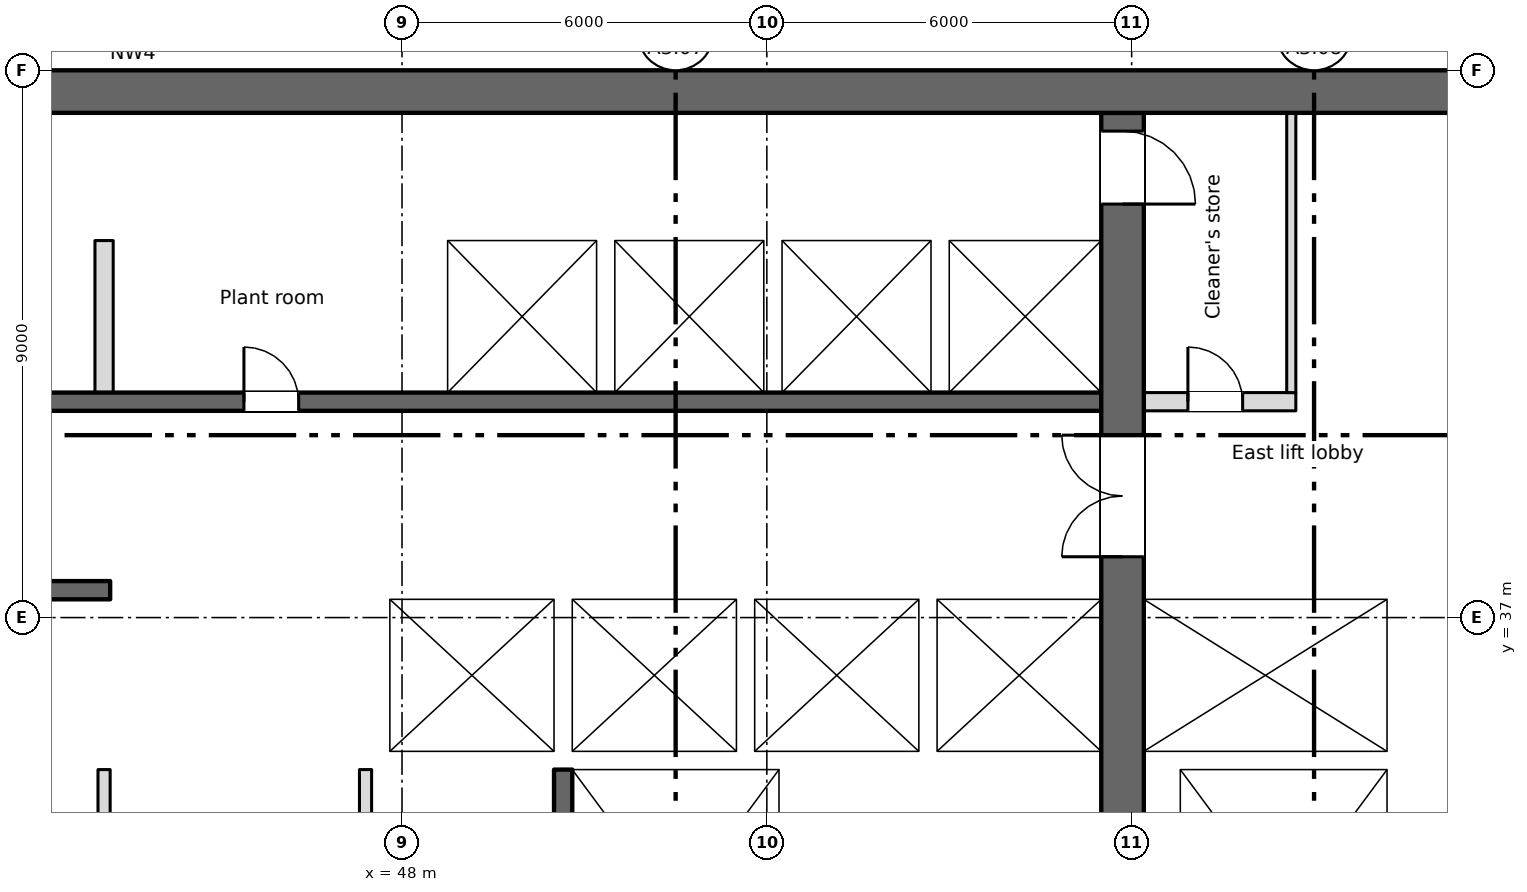
"""IFC4 building model, lengths in metres.
Left out: names, types, materials, properties, quantities, classifications, styles, units other than length and angle.
Written with IfcOpenShell. Run it as: python <this file> out.ifc"""

import sys

from ifc_helpers import new_model, si_unit, direction, frame, frame_2d, origin, place, context, subcontext, project, spatial, rectangle, extrude, element, fill, save


model = new_model("IFC4")
c1 = context("Model", 3, precision=1e-05, world=origin(), true_north=direction((0.0, 1.0)))
c2 = subcontext(c1, "Body", "Model", "MODEL_VIEW")
j1 = project(units=[si_unit("LENGTHUNIT", "METRE"), si_unit("PLANEANGLEUNIT", "RADIAN")], contexts=[c1])
p1 = place(None, origin())
s1 = spatial("IfcSite", under=j1, at=p1, CompositionType="ELEMENT")
p2 = place(p1, origin())
s2 = spatial("IfcBuilding", under=s1, at=p2, CompositionType="ELEMENT")
p3 = place(p2, frame((0.0, 0.0, 208.0)))
s3 = spatial("IfcBuildingStorey", under=s2, at=p3, CompositionType="ELEMENT", Elevation=208.0)
p4 = place(p3, frame((11.55, 45.65, 0.0), z_axis=(0.0, 0.0, 1.0), x_axis=(1.0, 0.0, 0.0)))
e1 = element("IfcWall", 1, at=p4, inside=s3, PredefinedType="SHEAR", context=c2, shape_type="SweptSolid", body=[
    extrude(rectangle(XDim=54.9, YDim=0.7, at=frame_2d((27.45, 0.0))), origin(), (0.0, 0.0, 1.0), 3.35),
])
p5 = place(p3, frame((64.35, 34.8, 0.0), z_axis=(0.0, 0.0, 1.0), x_axis=(0.0, 1.0, 0.0)))
e2 = element("IfcWall", 2, at=p5, inside=s3, PredefinedType="SHEAR", context=c2, shape_type="SweptSolid", body=[
    extrude(rectangle(XDim=10.5, YDim=0.3, at=frame_2d((5.25, 0.0))), origin(), (0.0, 0.0, 1.0), 3.35),
])
p6 = place(p3, frame((59.85, 28.4, 0.0), z_axis=(0.0, 0.0, 1.0), x_axis=(0.0, 1.0, 0.0)))
e3 = element("IfcWall", 3, at=p6, inside=s3, PredefinedType="SHEAR", context=c2, shape_type="SweptSolid", body=[
    extrude(rectangle(XDim=16.9, YDim=0.7, at=frame_2d((8.45, 0.0))), origin(), (0.0, 0.0, 1.0), 3.35),
])
p7 = place(p6, frame((9.6, 0.0, 0.0)))
e4 = element("IfcOpeningElement", 4, at=p7, cuts=e3, PredefinedType="OPENING", context=c2, shape_type="SweptSolid", body=[
    extrude(rectangle(XDim=2.0, YDim=2.1, at=frame_2d((1.0, 1.05))), frame((0.0, 0.36, 0.0), z_axis=(0.0, -1.0, 0.0), x_axis=(1.0, 0.0, 0.0)), (0.0, 0.0, 1.0), 0.72),
])
p8 = place(p6, frame((15.4, 0.0, 0.0)))
e5 = element("IfcOpeningElement", 5, at=p8, cuts=e3, PredefinedType="OPENING", context=c2, shape_type="SweptSolid", body=[
    extrude(rectangle(XDim=1.2, YDim=2.1, at=frame_2d((0.6, 1.05))), frame((0.0, 0.36, 0.0), z_axis=(0.0, -1.0, 0.0), x_axis=(1.0, 0.0, 0.0)), (0.0, 0.0, 1.0), 0.72),
])
p9 = place(p3, frame((50.65, 34.5, 0.0), z_axis=(0.0, 0.0, 1.0), x_axis=(0.0, -1.0, 0.0)))
e6 = element("IfcWall", 6, at=p9, inside=s3, PredefinedType="SHEAR", context=c2, shape_type="SweptSolid", body=[
    extrude(rectangle(XDim=6.1, YDim=0.3, at=frame_2d((3.05, 0.0))), origin(), (0.0, 0.0, 1.0), 3.35),
])
p10 = place(p9, frame((4.95, 0.0, 0.0)))
e7 = element("IfcOpeningElement", 7, at=p10, cuts=e6, PredefinedType="OPENING", context=c2, shape_type="SweptSolid", body=[
    extrude(rectangle(XDim=1.1, YDim=2.1, at=frame_2d((0.55, 1.05))), frame((0.0, 0.16, 0.0), z_axis=(0.0, -1.0, 0.0), x_axis=(1.0, 0.0, 0.0)), (0.0, 0.0, 1.0), 0.32),
])
p11 = place(p3, frame((54.35, 28.4, 0.0), z_axis=(0.0, 0.0, 1.0), x_axis=(0.0, 1.0, 0.0)))
e8 = element("IfcWall", 8, at=p11, inside=s3, PredefinedType="SHEAR", context=c2, shape_type="SweptSolid", body=[
    extrude(rectangle(XDim=6.1, YDim=0.3, at=frame_2d((3.05, 0.0))), origin(), (0.0, 0.0, 1.0), 3.35),
])
p12 = place(p3, frame((60.5, 28.4, 0.0), z_axis=(0.0, 0.0, 1.0), x_axis=(0.0, 1.0, 0.0)))
e9 = element("IfcWall", 9, at=p12, inside=s3, PredefinedType="SHEAR", context=c2, shape_type="SweptSolid", body=[
    extrude(rectangle(XDim=6.1, YDim=0.6, at=frame_2d((3.05, 0.0))), origin(), (0.0, 0.0, 1.0), 3.35),
])
p13 = place(p3, frame((64.35, 28.4, 0.0), z_axis=(0.0, 0.0, 1.0), x_axis=(0.0, 1.0, 0.0)))
e10 = element("IfcWall", 10, at=p13, inside=s3, PredefinedType="SHEAR", context=c2, shape_type="SweptSolid", body=[
    extrude(rectangle(XDim=6.1, YDim=0.3, at=frame_2d((3.05, 0.0))), origin(), (0.0, 0.0, 1.0), 3.35),
])
p14 = place(p3, frame((34.8, 34.65, 0.0), z_axis=(0.0, 0.0, 1.0), x_axis=(1.0, 0.0, 0.0)))
e11 = element("IfcWall", 11, at=p14, inside=s3, PredefinedType="SHEAR", context=c2, shape_type="SweptSolid", body=[
    extrude(rectangle(XDim=8.4, YDim=0.3, at=frame_2d((4.2, 0.0))), origin(), (0.0, 0.0, 1.0), 3.35),
])
p15 = place(p3, frame((47.3, 34.65, 0.0), z_axis=(0.0, 0.0, 1.0), x_axis=(1.0, 0.0, 0.0)))
e12 = element("IfcWall", 12, at=p15, inside=s3, PredefinedType="SHEAR", context=c2, shape_type="SweptSolid", body=[
    extrude(rectangle(XDim=12.2, YDim=0.3, at=frame_2d((6.1, 0.0))), origin(), (0.0, 0.0, 1.0), 3.35),
])
p16 = place(p15, frame((1.3, 0.0, 0.0)))
e13 = element("IfcOpeningElement", 13, at=p16, cuts=e12, PredefinedType="OPENING", context=c2, shape_type="SweptSolid", body=[
    extrude(rectangle(XDim=1.1, YDim=2.1, at=frame_2d((0.55, 1.05))), frame((0.0, 0.16, 0.0), z_axis=(0.0, -1.0, 0.0), x_axis=(1.0, 0.0, 0.0)), (0.0, 0.0, 1.0), 0.32),
])
p17 = place(p3, frame((60.2, 34.65, 0.0), z_axis=(0.0, 0.0, 1.0), x_axis=(1.0, 0.0, 0.0)))
e14 = element("IfcWall", 14, at=p17, inside=s3, PredefinedType="SHEAR", context=c2, shape_type="SweptSolid", body=[
    extrude(rectangle(XDim=4.3, YDim=0.3, at=frame_2d((2.15, 0.0))), origin(), (0.0, 0.0, 1.0), 3.35),
])
p18 = place(p3, frame((43.2, 37.45, 0.0), z_axis=(0.0, 0.0, 1.0), x_axis=(-1.0, 0.0, 0.0)))
e15 = element("IfcWall", 15, at=p18, inside=s3, PredefinedType="SHEAR", context=c2, shape_type="SweptSolid", body=[
    extrude(rectangle(XDim=8.4, YDim=0.3, at=frame_2d((4.2, 0.0))), origin(), (0.0, 0.0, 1.0), 3.35),
])
p19 = place(p18, frame((3.75, 0.0, 0.0)))
e16 = element("IfcOpeningElement", 16, at=p19, cuts=e15, PredefinedType="OPENING", context=c2, shape_type="SweptSolid", body=[
    extrude(rectangle(XDim=0.9, YDim=2.1, at=frame_2d((0.45, 1.05))), frame((0.0, 0.16, 0.0), z_axis=(0.0, -1.0, 0.0), x_axis=(1.0, 0.0, 0.0)), (0.0, 0.0, 1.0), 0.32),
])
p20 = place(p3, frame((47.3, 37.45, 0.0), z_axis=(0.0, 0.0, 1.0), x_axis=(1.0, 0.0, 0.0)))
e17 = element("IfcWall", 17, at=p20, inside=s3, PredefinedType="SHEAR", context=c2, shape_type="SweptSolid", body=[
    extrude(rectangle(XDim=12.2, YDim=0.3, at=frame_2d((6.1, 0.0))), origin(), (0.0, 0.0, 1.0), 3.35),
])
p21 = place(p20, frame((4.3, 0.0, 0.0)))
e18 = element("IfcOpeningElement", 18, at=p21, cuts=e17, PredefinedType="OPENING", context=c2, shape_type="SweptSolid", body=[
    extrude(rectangle(XDim=1.1, YDim=2.1, at=frame_2d((0.55, 1.05))), frame((0.0, 0.16, 0.0), z_axis=(0.0, -1.0, 0.0), x_axis=(1.0, 0.0, 0.0)), (0.0, 0.0, 1.0), 0.32),
])
p22 = place(p20, frame((7.3, 0.0, 0.0)))
e19 = element("IfcOpeningElement", 19, at=p22, cuts=e17, PredefinedType="OPENING", context=c2, shape_type="SweptSolid", body=[
    extrude(rectangle(XDim=1.1, YDim=2.1, at=frame_2d((0.55, 1.05))), frame((0.0, 0.16, 0.0), z_axis=(0.0, -1.0, 0.0), x_axis=(1.0, 0.0, 0.0)), (0.0, 0.0, 1.0), 0.32),
])
p23 = place(p20, frame((10.3, 0.0, 0.0)))
e20 = element("IfcOpeningElement", 20, at=p23, cuts=e17, PredefinedType="OPENING", context=c2, shape_type="SweptSolid", body=[
    extrude(rectangle(XDim=1.1, YDim=2.1, at=frame_2d((0.55, 1.05))), frame((0.0, 0.16, 0.0), z_axis=(0.0, -1.0, 0.0), x_axis=(1.0, 0.0, 0.0)), (0.0, 0.0, 1.0), 0.32),
])
p24 = place(p3, frame((60.2, 37.45, 0.0), z_axis=(0.0, 0.0, 1.0), x_axis=(1.0, 0.0, 0.0)))
e21 = element("IfcWall", 21, at=p24, inside=s3, PredefinedType="SHEAR", context=c2, shape_type="SweptSolid", body=[
    extrude(rectangle(XDim=4.0, YDim=0.3, at=frame_2d((2.0, 0.0))), origin(), (0.0, 0.0, 1.0), 3.35),
])
p25 = place(p24, frame((1.45, 0.0, 0.0)))
e22 = element("IfcOpeningElement", 22, at=p25, cuts=e21, PredefinedType="OPENING", context=c2, shape_type="SweptSolid", body=[
    extrude(rectangle(XDim=1.1, YDim=2.1, at=frame_2d((0.55, 1.05))), frame((0.0, 0.16, 0.0), z_axis=(0.0, -1.0, 0.0), x_axis=(1.0, 0.0, 0.0)), (0.0, 0.0, 1.0), 0.32),
])
p26 = place(p3, frame((43.05, 34.8, 0.0), z_axis=(0.0, 0.0, 1.0), x_axis=(0.0, 1.0, 0.0)))
e23 = element("IfcWall", 23, at=p26, inside=s3, PredefinedType="SHEAR", context=c2, shape_type="SweptSolid", body=[
    extrude(rectangle(XDim=2.5, YDim=0.3, at=frame_2d((1.25, 0.0))), origin(), (0.0, 0.0, 1.0), 3.35),
])
p27 = place(p3, frame((47.55, 34.8, 0.0), z_axis=(0.0, 0.0, 1.0), x_axis=(0.0, 1.0, 0.0)))
e24 = element("IfcWall", 24, at=p27, inside=s3, PredefinedType="SHEAR", context=c2, shape_type="SweptSolid", body=[
    extrude(rectangle(XDim=2.5, YDim=0.5, at=frame_2d((1.25, 0.0))), origin(), (0.0, 0.0, 1.0), 3.35),
])
p28 = place(p3, frame((50.65, 34.8, 0.0), z_axis=(0.0, 0.0, 1.0), x_axis=(0.0, 1.0, 0.0)))
e25 = element("IfcWall", 25, at=p28, inside=s3, PredefinedType="SHEAR", context=c2, shape_type="SweptSolid", body=[
    extrude(rectangle(XDim=2.5, YDim=0.3, at=frame_2d((1.25, 0.0))), origin(), (0.0, 0.0, 1.0), 3.35),
])
p29 = place(p3, frame((18.5, 40.55, 0.0), z_axis=(0.0, 0.0, 1.0), x_axis=(1.0, 0.0, 0.0)))
e26 = element("IfcWall", 26, at=p29, inside=s3, PredefinedType="SHEAR", context=c2, shape_type="SweptSolid", body=[
    extrude(rectangle(XDim=41.0, YDim=0.3, at=frame_2d((20.5, 0.0))), origin(), (0.0, 0.0, 1.0), 3.35),
])
p30 = place(p29, frame((2.15, 0.0, 0.0)))
e27 = element("IfcOpeningElement", 27, at=p30, cuts=e26, PredefinedType="OPENING", context=c2, shape_type="SweptSolid", body=[
    extrude(rectangle(XDim=0.9, YDim=2.1, at=frame_2d((0.45, 1.05))), frame((0.0, 0.16, 0.0), z_axis=(0.0, -1.0, 0.0), x_axis=(1.0, 0.0, 0.0)), (0.0, 0.0, 1.0), 0.32),
])
p31 = place(p29, frame((15.9, 0.0, 0.0)))
e28 = element("IfcOpeningElement", 28, at=p31, cuts=e26, PredefinedType="OPENING", context=c2, shape_type="SweptSolid", body=[
    extrude(rectangle(XDim=0.9, YDim=2.1, at=frame_2d((0.45, 1.05))), frame((0.0, 0.16, 0.0), z_axis=(0.0, -1.0, 0.0), x_axis=(1.0, 0.0, 0.0)), (0.0, 0.0, 1.0), 0.32),
])
p32 = place(p29, frame((21.4, 0.0, 0.0)))
e29 = element("IfcOpeningElement", 29, at=p32, cuts=e26, PredefinedType="OPENING", context=c2, shape_type="SweptSolid", body=[
    extrude(rectangle(XDim=0.9, YDim=2.1, at=frame_2d((0.45, 1.05))), frame((0.0, 0.16, 0.0), z_axis=(0.0, -1.0, 0.0), x_axis=(1.0, 0.0, 0.0)), (0.0, 0.0, 1.0), 0.32),
])
p33 = place(p29, frame((26.9, 0.0, 0.0)))
e30 = element("IfcOpeningElement", 30, at=p33, cuts=e26, PredefinedType="OPENING", context=c2, shape_type="SweptSolid", body=[
    extrude(rectangle(XDim=0.9, YDim=2.1, at=frame_2d((0.45, 1.05))), frame((0.0, 0.16, 0.0), z_axis=(0.0, -1.0, 0.0), x_axis=(1.0, 0.0, 0.0)), (0.0, 0.0, 1.0), 0.32),
])
p34 = place(p29, frame((6.175, 0.0, 0.0)))
e31 = element("IfcOpeningElement", 31, at=p34, cuts=e26, PredefinedType="OPENING", context=c2, shape_type="SweptSolid", body=[
    extrude(rectangle(XDim=1.1, YDim=2.1, at=frame_2d((0.55, 1.05))), frame((0.0, 0.16, 0.0), z_axis=(0.0, -1.0, 0.0), x_axis=(1.0, 0.0, 0.0)), (0.0, 0.0, 1.0), 0.32),
])
p35 = place(p29, frame((8.925, 0.0, 0.0)))
e32 = element("IfcOpeningElement", 32, at=p35, cuts=e26, PredefinedType="OPENING", context=c2, shape_type="SweptSolid", body=[
    extrude(rectangle(XDim=1.1, YDim=2.1, at=frame_2d((0.55, 1.05))), frame((0.0, 0.16, 0.0), z_axis=(0.0, -1.0, 0.0), x_axis=(1.0, 0.0, 0.0)), (0.0, 0.0, 1.0), 0.32),
])
p36 = place(p29, frame((11.675, 0.0, 0.0)))
e33 = element("IfcOpeningElement", 33, at=p36, cuts=e26, PredefinedType="OPENING", context=c2, shape_type="SweptSolid", body=[
    extrude(rectangle(XDim=1.1, YDim=2.1, at=frame_2d((0.55, 1.05))), frame((0.0, 0.16, 0.0), z_axis=(0.0, -1.0, 0.0), x_axis=(1.0, 0.0, 0.0)), (0.0, 0.0, 1.0), 0.32),
])
p37 = place(p29, frame((30.925, 0.0, 0.0)))
e34 = element("IfcOpeningElement", 34, at=p37, cuts=e26, PredefinedType="OPENING", context=c2, shape_type="SweptSolid", body=[
    extrude(rectangle(XDim=1.1, YDim=2.1, at=frame_2d((0.55, 1.05))), frame((0.0, 0.16, 0.0), z_axis=(0.0, -1.0, 0.0), x_axis=(1.0, 0.0, 0.0)), (0.0, 0.0, 1.0), 0.32),
])
p38 = place(p29, frame((33.675, 0.0, 0.0)))
e35 = element("IfcOpeningElement", 35, at=p38, cuts=e26, PredefinedType="OPENING", context=c2, shape_type="SweptSolid", body=[
    extrude(rectangle(XDim=1.1, YDim=2.1, at=frame_2d((0.55, 1.05))), frame((0.0, 0.16, 0.0), z_axis=(0.0, -1.0, 0.0), x_axis=(1.0, 0.0, 0.0)), (0.0, 0.0, 1.0), 0.32),
])
p39 = place(p29, frame((36.375, 0.0, 0.0)))
e36 = element("IfcOpeningElement", 36, at=p39, cuts=e26, PredefinedType="OPENING", context=c2, shape_type="SweptSolid", body=[
    extrude(rectangle(XDim=1.2, YDim=2.1, at=frame_2d((0.6, 1.05))), frame((0.0, 0.16, 0.0), z_axis=(0.0, -1.0, 0.0), x_axis=(1.0, 0.0, 0.0)), (0.0, 0.0, 1.0), 0.32),
])
p40 = place(p29, frame((39.15, 0.0, 0.0)))
e37 = element("IfcOpeningElement", 37, at=p40, cuts=e26, PredefinedType="OPENING", context=c2, shape_type="SweptSolid", body=[
    extrude(rectangle(XDim=1.2, YDim=2.1, at=frame_2d((0.6, 1.05))), frame((0.0, 0.16, 0.0), z_axis=(0.0, -1.0, 0.0), x_axis=(1.0, 0.0, 0.0)), (0.0, 0.0, 1.0), 0.32),
])
p41 = place(p3, frame((18.5, 43.35, 0.0), z_axis=(0.0, 0.0, 1.0), x_axis=(1.0, 0.0, 0.0)))
e38 = element("IfcWall", 38, at=p41, inside=s3, PredefinedType="SHEAR", context=c2, shape_type="SweptSolid", body=[
    extrude(rectangle(XDim=41.0, YDim=0.3, at=frame_2d((20.5, 0.0))), origin(), (0.0, 0.0, 1.0), 3.35),
])
p42 = place(p3, frame((60.2, 40.55, 0.0), z_axis=(0.0, 0.0, 1.0), x_axis=(1.0, 0.0, 0.0)))
e39 = element("IfcWall", 39, at=p42, inside=s3, PredefinedType="PARTITIONING", context=c2, shape_type="SweptSolid", body=[
    extrude(rectangle(XDim=2.5, YDim=0.3, at=frame_2d((1.25, 0.0))), origin(), (0.0, 0.0, 1.0), 3.35),
])
p43 = place(p42, frame((0.725, 0.0, 0.0)))
e40 = element("IfcOpeningElement", 40, at=p43, cuts=e39, PredefinedType="OPENING", context=c2, shape_type="SweptSolid", body=[
    extrude(rectangle(XDim=0.9, YDim=2.1, at=frame_2d((0.45, 1.05))), frame((0.0, 0.16, 0.0), z_axis=(0.0, -1.0, 0.0), x_axis=(1.0, 0.0, 0.0)), (0.0, 0.0, 1.0), 0.32),
])
for number, where, z_axis, x_axis in (
    (41, (53.65, 34.8, 0.0), (0.0, 0.0, 1.0), (0.0, 1.0, 0.0)),
    (42, (56.65, 34.8, 0.0), (0.0, 0.0, 1.0), (0.0, 1.0, 0.0)),
    (43, (48.6, 40.7, 0.0), (0.0, 0.0, 1.0), (0.0, 1.0, 0.0)),
    (44, (51.35, 40.7, 0.0), (0.0, 0.0, 1.0), (0.0, 1.0, 0.0)),
    (45, (54.1, 40.7, 0.0), (0.0, 0.0, 1.0), (0.0, 1.0, 0.0)),
    (46, (56.85, 40.7, 0.0), (0.0, 0.0, 1.0), (0.0, 1.0, 0.0)),
):
    element("IfcWall", number, at=place(p3, frame(where, z_axis=z_axis, x_axis=x_axis)), inside=s3, PredefinedType="SHEAR", context=c2, shape_type="SweptSolid", body=[
        extrude(rectangle(XDim=2.5, YDim=0.3, at=frame_2d((1.25, 0.0))), origin(), (0.0, 0.0, 1.0), 3.35),
    ])
for number, where, z_axis, x_axis in (
    (47, (43.1, 28.4, 0.0), (0.0, 0.0, 1.0), (0.0, 1.0, 0.0)),
    (48, (47.4, 28.4, 0.0), (0.0, 0.0, 1.0), (0.0, 1.0, 0.0)),
):
    element("IfcWall", number, at=place(p3, frame(where, z_axis=z_axis, x_axis=x_axis)), inside=s3, PredefinedType="PARTITIONING", context=c2, shape_type="SweptSolid", body=[
        extrude(rectangle(XDim=6.1, YDim=0.2, at=frame_2d((3.05, 0.0))), origin(), (0.0, 0.0, 1.0), 3.35),
    ])
p44 = place(p3, frame((62.625, 40.7, 0.0), z_axis=(0.0, 0.0, 1.0), x_axis=(0.0, 1.0, 0.0)))
e49 = element("IfcWall", 49, at=p44, inside=s3, PredefinedType="PARTITIONING", context=c2, shape_type="SweptSolid", body=[
    extrude(rectangle(XDim=4.6, YDim=0.15, at=frame_2d((2.3, 0.0))), origin(), (0.0, 0.0, 1.0), 3.35),
])
p45 = place(p3, frame((43.1, 40.7, 0.0), z_axis=(0.0, 0.0, 1.0), x_axis=(0.0, 1.0, 0.0)))
e50 = element("IfcWall", 50, at=p45, inside=s3, PredefinedType="PARTITIONING", context=c2, shape_type="SweptSolid", body=[
    extrude(rectangle(XDim=2.5, YDim=0.3, at=frame_2d((1.25, 0.0))), origin(), (0.0, 0.0, 1.0), 3.35),
])
p46 = place(p43, origin())
e51 = element("IfcDoor", 51, at=p46, inside=s3, OperationType="SINGLE_SWING_LEFT", PredefinedType="DOOR", context=c2, shape_type="SweptSolid", body=[
    extrude(rectangle(XDim=0.9, YDim=2.1, at=frame_2d((0.45, 1.05))), frame((0.0, 0.025, 0.0), z_axis=(0.0, -1.0, 0.0), x_axis=(1.0, 0.0, 0.0)), (0.0, 0.0, 1.0), 0.05),
])
fill(e40, e51)
p47 = place(p33, origin())
e52 = element("IfcDoor", 52, at=p47, inside=s3, OperationType="SINGLE_SWING_LEFT", PredefinedType="DOOR", context=c2, shape_type="SweptSolid", body=[
    extrude(rectangle(XDim=0.9, YDim=2.1, at=frame_2d((0.45, 1.05))), frame((0.0, 0.025, 0.0), z_axis=(0.0, -1.0, 0.0), x_axis=(1.0, 0.0, 0.0)), (0.0, 0.0, 1.0), 0.05),
])
fill(e30, e52)
p48 = place(p21, origin())
e53 = element("IfcDoor", 53, at=p48, inside=s3, OperationType="SLIDING_TO_LEFT", PredefinedType="DOOR", context=c2, shape_type="SweptSolid", body=[
    extrude(rectangle(XDim=1.1, YDim=2.1, at=frame_2d((0.55, 1.05))), frame((0.0, 0.025, 0.0), z_axis=(0.0, -1.0, 0.0), x_axis=(1.0, 0.0, 0.0)), (0.0, 0.0, 1.0), 0.05),
])
fill(e18, e53)
p49 = place(p22, origin())
e54 = element("IfcDoor", 54, at=p49, inside=s3, OperationType="SLIDING_TO_LEFT", PredefinedType="DOOR", context=c2, shape_type="SweptSolid", body=[
    extrude(rectangle(XDim=1.1, YDim=2.1, at=frame_2d((0.55, 1.05))), frame((0.0, 0.025, 0.0), z_axis=(0.0, -1.0, 0.0), x_axis=(1.0, 0.0, 0.0)), (0.0, 0.0, 1.0), 0.05),
])
fill(e19, e54)
p50 = place(p23, origin())
e55 = element("IfcDoor", 55, at=p50, inside=s3, OperationType="SLIDING_TO_LEFT", PredefinedType="DOOR", context=c2, shape_type="SweptSolid", body=[
    extrude(rectangle(XDim=1.1, YDim=2.1, at=frame_2d((0.55, 1.05))), frame((0.0, 0.025, 0.0), z_axis=(0.0, -1.0, 0.0), x_axis=(1.0, 0.0, 0.0)), (0.0, 0.0, 1.0), 0.05),
])
fill(e20, e55)
p51 = place(p37, origin())
e56 = element("IfcDoor", 56, at=p51, inside=s3, OperationType="SLIDING_TO_LEFT", PredefinedType="DOOR", context=c2, shape_type="SweptSolid", body=[
    extrude(rectangle(XDim=1.1, YDim=2.1, at=frame_2d((0.55, 1.05))), frame((0.0, 0.025, 0.0), z_axis=(0.0, -1.0, 0.0), x_axis=(1.0, 0.0, 0.0)), (0.0, 0.0, 1.0), 0.05),
])
fill(e34, e56)
p52 = place(p38, origin())
e57 = element("IfcDoor", 57, at=p52, inside=s3, OperationType="SLIDING_TO_LEFT", PredefinedType="DOOR", context=c2, shape_type="SweptSolid", body=[
    extrude(rectangle(XDim=1.1, YDim=2.1, at=frame_2d((0.55, 1.05))), frame((0.0, 0.025, 0.0), z_axis=(0.0, -1.0, 0.0), x_axis=(1.0, 0.0, 0.0)), (0.0, 0.0, 1.0), 0.05),
])
fill(e35, e57)
p53 = place(p39, origin())
e58 = element("IfcDoor", 58, at=p53, inside=s3, OperationType="SLIDING_TO_LEFT", PredefinedType="DOOR", context=c2, shape_type="SweptSolid", body=[
    extrude(rectangle(XDim=1.2, YDim=2.1, at=frame_2d((0.6, 1.05))), frame((0.0, 0.025, 0.0), z_axis=(0.0, -1.0, 0.0), x_axis=(1.0, 0.0, 0.0)), (0.0, 0.0, 1.0), 0.05),
])
fill(e36, e58)
p54 = place(p40, origin())
e59 = element("IfcDoor", 59, at=p54, inside=s3, OperationType="SLIDING_TO_LEFT", PredefinedType="DOOR", context=c2, shape_type="SweptSolid", body=[
    extrude(rectangle(XDim=1.2, YDim=2.1, at=frame_2d((0.6, 1.05))), frame((0.0, 0.025, 0.0), z_axis=(0.0, -1.0, 0.0), x_axis=(1.0, 0.0, 0.0)), (0.0, 0.0, 1.0), 0.05),
])
fill(e37, e59)
p55 = place(p25, origin())
e60 = element("IfcDoor", 60, at=p55, inside=s3, OperationType="SLIDING_TO_LEFT", PredefinedType="DOOR", context=c2, shape_type="SweptSolid", body=[
    extrude(rectangle(XDim=1.1, YDim=2.1, at=frame_2d((0.55, 1.05))), frame((0.0, 0.025, 0.0), z_axis=(0.0, -1.0, 0.0), x_axis=(1.0, 0.0, 0.0)), (0.0, 0.0, 1.0), 0.05),
])
fill(e22, e60)
p56 = place(p16, origin())
e61 = element("IfcDoor", 61, at=p56, inside=s3, OperationType="SLIDING_TO_LEFT", PredefinedType="DOOR", context=c2, shape_type="SweptSolid", body=[
    extrude(rectangle(XDim=1.1, YDim=2.1, at=frame_2d((0.55, 1.05))), frame((0.0, 0.025, 0.0), z_axis=(0.0, -1.0, 0.0), x_axis=(1.0, 0.0, 0.0)), (0.0, 0.0, 1.0), 0.05),
])
fill(e13, e61)
p57 = place(p7, origin())
e62 = element("IfcDoor", 62, at=p57, inside=s3, OperationType="DOUBLE_DOOR_SINGLE_SWING", PredefinedType="DOOR", context=c2, shape_type="SweptSolid", body=[
    extrude(rectangle(XDim=2.0, YDim=2.1, at=frame_2d((1.0, 1.05))), frame((0.0, 0.025, 0.0), z_axis=(0.0, -1.0, 0.0), x_axis=(1.0, 0.0, 0.0)), (0.0, 0.0, 1.0), 0.05),
])
fill(e4, e62)
p58 = place(p8, origin())
e63 = element("IfcDoor", 63, at=p58, inside=s3, OperationType="SINGLE_SWING_LEFT", PredefinedType="DOOR", context=c2, shape_type="SweptSolid", body=[
    extrude(rectangle(XDim=1.2, YDim=2.1, at=frame_2d((0.6, 1.05))), frame((0.0, 0.025, 0.0), z_axis=(0.0, -1.0, 0.0), x_axis=(1.0, 0.0, 0.0)), (0.0, 0.0, 1.0), 0.05),
])
fill(e5, e63)
save(model, sys.argv[1])
